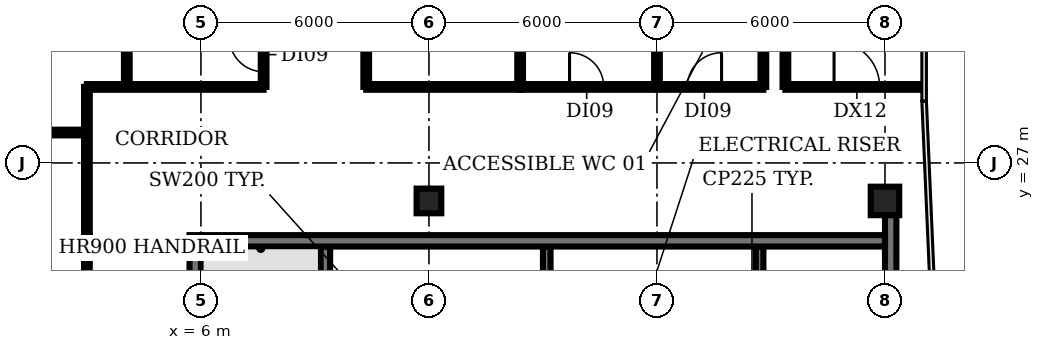
"""IFC4 building model, lengths in metres.
Left out: names, types, materials, properties, quantities, classifications, styles, units other than length and angle.
Written with IfcOpenShell. Run it as: python <this file> out.ifc"""

import sys

from ifc_helpers import new_model, si_unit, direction, frame, frame_2d, origin, origin_2d, place, context, subcontext, project, spatial, rectangle, extrude, element, fill, save


model = new_model("IFC4")
c1 = context("Model", 3, precision=1e-05, world=origin(), true_north=direction((0.0, 1.0)))
c2 = subcontext(c1, "Body", "Model", "MODEL_VIEW")
j1 = project(units=[si_unit("LENGTHUNIT", "METRE"), si_unit("PLANEANGLEUNIT", "RADIAN")], contexts=[c1])
p1 = place(None, origin())
s1 = spatial("IfcSite", under=j1, at=p1, CompositionType="ELEMENT")
p2 = place(p1, origin())
s2 = spatial("IfcBuilding", under=s1, at=p2, CompositionType="ELEMENT")
p3 = place(p2, frame((0.0, 0.0, 297.8)))
s3 = spatial("IfcBuildingStorey", under=s2, at=p3, CompositionType="ELEMENT", Elevation=297.8)
p4 = place(p3, frame((12.0, 26.0, 0.0), z_axis=(0.0, 0.0, 1.0), x_axis=(1.0, 0.0, 0.0)))
e1 = element("IfcColumn", 1, at=p4, inside=s3, PredefinedType="COLUMN", context=c2, shape_type="SweptSolid", body=[
    extrude(rectangle(XDim=0.65, YDim=0.65, at=origin_2d()), origin(), (0.0, 0.0, 1.0), 3.85),
])
p5 = place(p3, frame((24.0, 26.0, 0.0), z_axis=(0.0, 0.0, 1.0), x_axis=(1.0, 0.0, 0.0)))
e2 = element("IfcColumn", 2, at=p5, inside=s3, PredefinedType="COLUMN", context=c2, shape_type="SweptSolid", body=[
    extrude(rectangle(XDim=0.75, YDim=0.75, at=origin_2d()), origin(), (0.0, 0.0, 1.0), 3.85),
])
p6 = place(p3, frame((9.275, 18.375, 0.0), z_axis=(0.0, 0.0, 1.0), x_axis=(0.0, 1.0, 0.0)))
e3 = element("IfcWall", 3, at=p6, inside=s3, PredefinedType="SHEAR", context=c2, shape_type="SweptSolid", body=[
    extrude(rectangle(XDim=6.425, YDim=0.25, at=frame_2d((3.212, 0.0))), origin(), (0.0, 0.0, 1.0), 3.85),
])
for number, where, z_axis, x_axis in (
    (4, (15.1, 22.9, 0.0), (0.0, 0.0, 1.0), (0.0, 1.0, 0.0)),
    (5, (20.7, 22.9, 0.0), (0.0, 0.0, 1.0), (0.0, 1.0, 0.0)),
):
    element("IfcWall", number, at=place(p3, frame(where, z_axis=z_axis, x_axis=x_axis)), inside=s3, PredefinedType="SHEAR", context=c2, shape_type="SweptSolid", body=[
        extrude(rectangle(XDim=1.9, YDim=0.2, at=frame_2d((0.95, 0.0))), origin(), (0.0, 0.0, 1.0), 3.85),
    ])
p7 = place(p3, frame((5.85, 5.1, 0.0), z_axis=(0.0, 0.0, 1.0), x_axis=(0.0, 1.0, 0.0)))
e6 = element("IfcWall", 6, at=p7, inside=s3, PredefinedType="SHEAR", context=c2, shape_type="SweptSolid", body=[
    extrude(rectangle(XDim=20.0, YDim=0.3, at=frame_2d((10.0, 0.0))), origin(), (0.0, 0.0, 1.0), 3.85),
])
p8 = place(p7, frame((0.55, 0.0, 0.0)))
e7 = element("IfcOpeningElement", 7, at=p8, cuts=e6, PredefinedType="OPENING", context=c2, shape_type="SweptSolid", body=[
    extrude(rectangle(XDim=1.5, YDim=2.1, at=frame_2d((0.75, 1.05))), frame((0.0, 0.16, 0.0), z_axis=(0.0, -1.0, 0.0), x_axis=(1.0, 0.0, 0.0)), (0.0, 0.0, 1.0), 0.32),
])
p9 = place(p7, frame((7.0, 0.0, 0.0)))
e8 = element("IfcOpeningElement", 8, at=p9, cuts=e6, PredefinedType="OPENING", context=c2, shape_type="SweptSolid", body=[
    extrude(rectangle(XDim=1.2, YDim=2.1, at=frame_2d((0.6, 1.05))), frame((0.0, 0.16, 0.0), z_axis=(0.0, -1.0, 0.0), x_axis=(1.0, 0.0, 0.0)), (0.0, 0.0, 1.0), 0.32),
])
p10 = place(p7, frame((13.55, 0.0, 0.0)))
e9 = element("IfcOpeningElement", 9, at=p10, cuts=e6, PredefinedType="OPENING", context=c2, shape_type="SweptSolid", body=[
    extrude(rectangle(XDim=1.2, YDim=2.1, at=frame_2d((0.6, 1.05))), frame((0.0, 0.16, 0.0), z_axis=(0.0, -1.0, 0.0), x_axis=(1.0, 0.0, 0.0)), (0.0, 0.0, 1.0), 0.32),
])
p11 = place(p3, frame((24.15, 25.655, 0.0), z_axis=(0.0, 0.0, 1.0), x_axis=(0.0, -1.0, 0.0)))
e10 = element("IfcWall", 10, at=p11, inside=s3, PredefinedType="SHEAR", context=c2, shape_type="SweptSolid", body=[
    extrude(rectangle(XDim=20.555, YDim=0.3, at=frame_2d((10.277, 0.0))), origin(), (0.0, 0.0, 1.0), 3.85),
])
p12 = place(p11, frame((18.505, 0.0, 0.0)))
e11 = element("IfcOpeningElement", 11, at=p12, cuts=e10, PredefinedType="OPENING", context=c2, shape_type="SweptSolid", body=[
    extrude(rectangle(XDim=1.5, YDim=2.1, at=frame_2d((0.75, 1.05))), frame((0.0, 0.16, 0.0), z_axis=(0.0, -1.0, 0.0), x_axis=(1.0, 0.0, 0.0)), (0.0, 0.0, 1.0), 0.32),
])
p13 = place(p11, frame((12.405, 0.0, 0.0)))
e12 = element("IfcOpeningElement", 12, at=p13, cuts=e10, PredefinedType="OPENING", context=c2, shape_type="SweptSolid", body=[
    extrude(rectangle(XDim=0.9, YDim=2.1, at=frame_2d((0.45, 1.05))), frame((0.0, 0.16, 0.0), z_axis=(0.0, -1.0, 0.0), x_axis=(1.0, 0.0, 0.0)), (0.0, 0.0, 1.0), 0.32),
])
p14 = place(p11, frame((6.405, 0.0, 0.0)))
e13 = element("IfcOpeningElement", 13, at=p14, cuts=e10, PredefinedType="OPENING", context=c2, shape_type="SweptSolid", body=[
    extrude(rectangle(XDim=2.0, YDim=2.1, at=frame_2d((1.0, 1.05))), frame((0.0, 0.16, 0.0), z_axis=(0.0, -1.0, 0.0), x_axis=(1.0, 0.0, 0.0)), (0.0, 0.0, 1.0), 0.32),
])
p15 = place(p3, frame((6.0, 24.95, 0.0), z_axis=(0.0, 0.0, 1.0), x_axis=(1.0, 0.0, 0.0)))
e14 = element("IfcWall", 14, at=p15, inside=s3, PredefinedType="SHEAR", context=c2, shape_type="SweptSolid", body=[
    extrude(rectangle(XDim=18.0, YDim=0.3, at=frame_2d((9.0, 0.0))), origin(), (0.0, 0.0, 1.0), 3.85),
])
p16 = place(p3, frame((-0.98, 27.8, 0.0), z_axis=(0.0, 0.0, 1.0), x_axis=(1.0, 0.0, 0.0)))
e15 = element("IfcWall", 15, at=p16, inside=s3, PredefinedType="PARTITIONING", context=c2, shape_type="SweptSolid", body=[
    extrude(rectangle(XDim=3.98, YDim=0.15, at=frame_2d((1.99, 0.0))), origin(), (0.0, 0.0, 1.0), 2.9),
])
p17 = place(p3, frame((3.0, 5.1, 0.0), z_axis=(0.0, 0.0, 1.0), x_axis=(0.0, 1.0, 0.0)))
e16 = element("IfcWall", 16, at=p17, inside=s3, PredefinedType="PARTITIONING", context=c2, shape_type="SweptSolid", body=[
    extrude(rectangle(XDim=20.0, YDim=0.15, at=frame_2d((10.0, 0.0))), origin(), (0.0, 0.0, 1.0), 2.9),
])
p18 = place(p17, frame((9.3, 0.0, 0.0)))
e17 = element("IfcOpeningElement", 17, at=p18, cuts=e16, PredefinedType="OPENING", context=c2, shape_type="SweptSolid", body=[
    extrude(rectangle(XDim=1.2, YDim=2.1, at=frame_2d((0.6, 1.05))), frame((0.0, 0.085, 0.0), z_axis=(0.0, -1.0, 0.0), x_axis=(1.0, 0.0, 0.0)), (0.0, 0.0, 1.0), 0.17),
])
p19 = place(p3, frame((3.0, 25.1, 0.0), z_axis=(0.0, 0.0, 1.0), x_axis=(0.0, 1.0, 0.0)))
e18 = element("IfcWall", 18, at=p19, inside=s3, PredefinedType="PARTITIONING", context=c2, shape_type="SweptSolid", body=[
    extrude(rectangle(XDim=3.9, YDim=0.15, at=frame_2d((1.95, 0.0))), origin(), (0.0, 0.0, 1.0), 2.9),
])
p20 = place(p3, frame((3.0, 29.0, 0.0), z_axis=(0.0, 0.0, 1.0), x_axis=(1.0, 0.0, 0.0)))
e19 = element("IfcWall", 19, at=p20, inside=s3, PredefinedType="PARTITIONING", context=c2, shape_type="SweptSolid", body=[
    extrude(rectangle(XDim=4.65, YDim=0.15, at=frame_2d((2.325, 0.0))), origin(), (0.0, 0.0, 1.0), 2.9),
])
p21 = place(p3, frame((4.05, 29.0, 0.0), z_axis=(0.0, 0.0, 1.0), x_axis=(0.0, 1.0, 0.0)))
e20 = element("IfcWall", 20, at=p21, inside=s3, PredefinedType="PARTITIONING", context=c2, shape_type="SweptSolid", body=[
    extrude(rectangle(XDim=4.8, YDim=0.15, at=frame_2d((2.4, 0.0))), origin(), (0.0, 0.0, 1.0), 2.9),
])
p22 = place(p3, frame((7.65, 29.0, 0.0), z_axis=(0.0, 0.0, 1.0), x_axis=(0.0, 1.0, 0.0)))
e21 = element("IfcWall", 21, at=p22, inside=s3, PredefinedType="PARTITIONING", context=c2, shape_type="SweptSolid", body=[
    extrude(rectangle(XDim=4.8, YDim=0.15, at=frame_2d((2.4, 0.0))), origin(), (0.0, 0.0, 1.0), 2.9),
])
p23 = place(p22, frame((0.4, 0.0, 0.0)))
e22 = element("IfcOpeningElement", 22, at=p23, cuts=e21, PredefinedType="OPENING", context=c2, shape_type="SweptSolid", body=[
    extrude(rectangle(XDim=0.9, YDim=2.1, at=frame_2d((0.45, 1.05))), frame((0.0, 0.085, 0.0), z_axis=(0.0, -1.0, 0.0), x_axis=(1.0, 0.0, 0.0)), (0.0, 0.0, 1.0), 0.17),
])
p24 = place(p3, frame((10.35, 29.0, 0.0), z_axis=(0.0, 0.0, 1.0), x_axis=(0.0, 1.0, 0.0)))
e23 = element("IfcWall", 23, at=p24, inside=s3, PredefinedType="PARTITIONING", context=c2, shape_type="SweptSolid", body=[
    extrude(rectangle(XDim=4.8, YDim=0.15, at=frame_2d((2.4, 0.0))), origin(), (0.0, 0.0, 1.0), 2.9),
])
p25 = place(p3, frame((10.35, 29.0, 0.0), z_axis=(0.0, 0.0, 1.0), x_axis=(1.0, 0.0, 0.0)))
e24 = element("IfcWall", 24, at=p25, inside=s3, PredefinedType="PARTITIONING", context=c2, shape_type="SweptSolid", body=[
    extrude(rectangle(XDim=4.05, YDim=0.15, at=frame_2d((2.025, 0.0))), origin(), (0.0, 0.0, 1.0), 2.9),
])
p26 = place(p3, frame((14.4, 29.0, 0.0), z_axis=(0.0, 0.0, 1.0), x_axis=(0.0, 1.0, 0.0)))
e25 = element("IfcWall", 25, at=p26, inside=s3, PredefinedType="PARTITIONING", context=c2, shape_type="SweptSolid", body=[
    extrude(rectangle(XDim=4.8, YDim=0.15, at=frame_2d((2.4, 0.0))), origin(), (0.0, 0.0, 1.0), 2.9),
])
p27 = place(p3, frame((14.4, 29.0, 0.0), z_axis=(0.0, 0.0, 1.0), x_axis=(1.0, 0.0, 0.0)))
e26 = element("IfcWall", 26, at=p27, inside=s3, PredefinedType="PARTITIONING", context=c2, shape_type="SweptSolid", body=[
    extrude(rectangle(XDim=3.6, YDim=0.15, at=frame_2d((1.8, 0.0))), origin(), (0.0, 0.0, 1.0), 2.9),
])
p28 = place(p27, frame((1.3, 0.0, 0.0)))
e27 = element("IfcOpeningElement", 27, at=p28, cuts=e26, PredefinedType="OPENING", context=c2, shape_type="SweptSolid", body=[
    extrude(rectangle(XDim=0.9, YDim=2.1, at=frame_2d((0.45, 1.05))), frame((0.0, 0.085, 0.0), z_axis=(0.0, -1.0, 0.0), x_axis=(1.0, 0.0, 0.0)), (0.0, 0.0, 1.0), 0.17),
])
p29 = place(p3, frame((18.0, 29.0, 0.0), z_axis=(0.0, 0.0, 1.0), x_axis=(0.0, 1.0, 0.0)))
e28 = element("IfcWall", 28, at=p29, inside=s3, PredefinedType="PARTITIONING", context=c2, shape_type="SweptSolid", body=[
    extrude(rectangle(XDim=4.8, YDim=0.15, at=frame_2d((2.4, 0.0))), origin(), (0.0, 0.0, 1.0), 2.9),
])
p30 = place(p3, frame((18.0, 29.0, 0.0), z_axis=(0.0, 0.0, 1.0), x_axis=(1.0, 0.0, 0.0)))
e29 = element("IfcWall", 29, at=p30, inside=s3, PredefinedType="PARTITIONING", context=c2, shape_type="SweptSolid", body=[
    extrude(rectangle(XDim=2.8, YDim=0.15, at=frame_2d((1.4, 0.0))), origin(), (0.0, 0.0, 1.0), 2.9),
])
p31 = place(p30, frame((0.8, 0.0, 0.0)))
e30 = element("IfcOpeningElement", 30, at=p31, cuts=e29, PredefinedType="OPENING", context=c2, shape_type="SweptSolid", body=[
    extrude(rectangle(XDim=0.9, YDim=2.1, at=frame_2d((0.45, 1.05))), frame((0.0, 0.085, 0.0), z_axis=(0.0, -1.0, 0.0), x_axis=(1.0, 0.0, 0.0)), (0.0, 0.0, 1.0), 0.17),
])
for number, where, z_axis, x_axis in (
    (31, (20.8, 29.0, 0.0), (0.0, 0.0, 1.0), (0.0, 1.0, 0.0)),
    (32, (21.38, 29.0, 0.0), (0.0, 0.0, 1.0), (0.0, 1.0, 0.0)),
):
    element("IfcWall", number, at=place(p3, frame(where, z_axis=z_axis, x_axis=x_axis)), inside=s3, PredefinedType="PARTITIONING", context=c2, shape_type="SweptSolid", body=[
        extrude(rectangle(XDim=4.8, YDim=0.15, at=frame_2d((2.4, 0.0))), origin(), (0.0, 0.0, 1.0), 2.9),
    ])
p32 = place(p3, frame((21.38, 29.0, 0.0), z_axis=(0.0, 0.0, 1.0), x_axis=(1.0, 0.0, 0.0)))
e33 = element("IfcWall", 33, at=p32, inside=s3, PredefinedType="PARTITIONING", context=c2, shape_type="SweptSolid", body=[
    extrude(rectangle(XDim=3.58, YDim=0.15, at=frame_2d((1.79, 0.0))), origin(), (0.0, 0.0, 1.0), 2.9),
])
p33 = place(p32, frame((1.28, 0.0, 0.0)))
e34 = element("IfcOpeningElement", 34, at=p33, cuts=e33, PredefinedType="OPENING", context=c2, shape_type="SweptSolid", body=[
    extrude(rectangle(XDim=1.2, YDim=2.1, at=frame_2d((0.6, 1.05))), frame((0.0, 0.085, 0.0), z_axis=(0.0, -1.0, 0.0), x_axis=(1.0, 0.0, 0.0)), (0.0, 0.0, 1.0), 0.17),
])
p34 = place(p23, origin())
e35 = element("IfcDoor", 35, at=p34, inside=s3, OperationType="SINGLE_SWING_RIGHT", PredefinedType="DOOR", context=c2, shape_type="SweptSolid", body=[
    extrude(rectangle(XDim=0.9, YDim=2.1, at=frame_2d((0.45, 1.05))), frame((0.0, 0.025, 0.0), z_axis=(0.0, -1.0, 0.0), x_axis=(1.0, 0.0, 0.0)), (0.0, 0.0, 1.0), 0.05),
])
fill(e22, e35)
p35 = place(p28, origin())
e36 = element("IfcDoor", 36, at=p35, inside=s3, OperationType="SINGLE_SWING_LEFT", PredefinedType="DOOR", context=c2, shape_type="SweptSolid", body=[
    extrude(rectangle(XDim=0.9, YDim=2.1, at=frame_2d((0.45, 1.05))), frame((0.0, 0.025, 0.0), z_axis=(0.0, -1.0, 0.0), x_axis=(1.0, 0.0, 0.0)), (0.0, 0.0, 1.0), 0.05),
])
fill(e27, e36)
p36 = place(p31, origin())
e37 = element("IfcDoor", 37, at=p36, inside=s3, OperationType="SINGLE_SWING_RIGHT", PredefinedType="DOOR", context=c2, shape_type="SweptSolid", body=[
    extrude(rectangle(XDim=0.9, YDim=2.1, at=frame_2d((0.45, 1.05))), frame((0.0, 0.025, 0.0), z_axis=(0.0, -1.0, 0.0), x_axis=(1.0, 0.0, 0.0)), (0.0, 0.0, 1.0), 0.05),
])
fill(e30, e37)
p37 = place(p33, origin())
e38 = element("IfcDoor", 38, at=p37, inside=s3, OperationType="SINGLE_SWING_LEFT", PredefinedType="DOOR", context=c2, shape_type="SweptSolid", body=[
    extrude(rectangle(XDim=1.2, YDim=2.1, at=frame_2d((0.6, 1.05))), frame((0.0, 0.025, 0.0), z_axis=(0.0, -1.0, 0.0), x_axis=(1.0, 0.0, 0.0)), (0.0, 0.0, 1.0), 0.05),
])
fill(e34, e38)
save(model, sys.argv[1])
